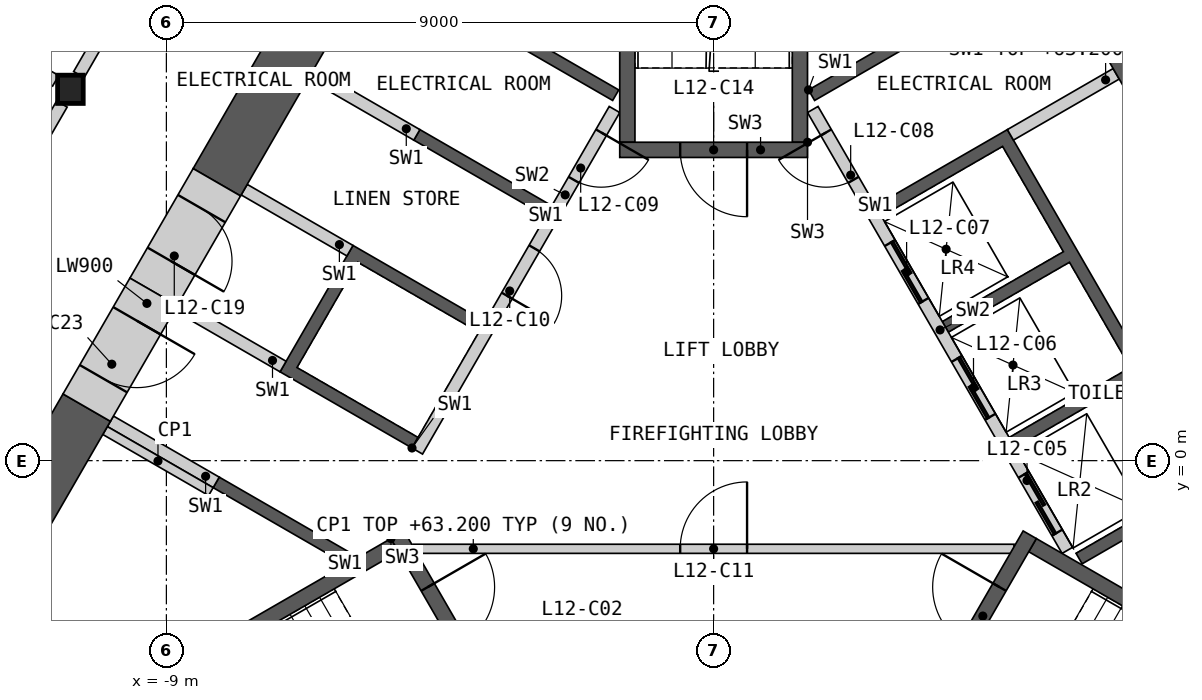
"""IFC4 building model, lengths in metres.
Left out: names, types, materials, properties, quantities, classifications, styles, units other than length and angle.
Written with IfcOpenShell. Run it as: python <this file> out.ifc"""

import sys

from ifc_helpers import new_model, si_unit, direction, frame, frame_2d, origin, origin_2d, place, context, subcontext, project, spatial, polyline, rectangle, i_section, outline, extrude, element, fill, save


model = new_model("IFC4")
c1 = context("Model", 3, precision=1e-05, world=origin(), true_north=direction((0.0, 1.0)))
c2 = subcontext(c1, "Body", "Model", "MODEL_VIEW")
j1 = project(units=[si_unit("LENGTHUNIT", "METRE"), si_unit("PLANEANGLEUNIT", "RADIAN")], contexts=[c1])
p1 = place(None, origin())
s1 = spatial("IfcSite", under=j1, at=p1, CompositionType="ELEMENT")
p2 = place(p1, origin())
s2 = spatial("IfcBuilding", under=s1, at=p2, CompositionType="ELEMENT")
p3 = place(p2, frame((0.0, 0.0, 59.4)))
s3 = spatial("IfcBuildingStorey", under=s2, at=p3, CompositionType="ELEMENT", Elevation=59.4)
p4 = place(p3, frame((-10.578, 6.107, 0.0), z_axis=(0.0, 0.0, 1.0), x_axis=(1.0, 0.0, 0.0)))
e1 = element("IfcColumn", 1, at=p4, inside=s3, PredefinedType="COLUMN", context=c2, shape_type="SweptSolid", body=[
    extrude(i_section(OverallWidth=0.421, OverallDepth=0.465, WebThickness=0.045, FlangeThickness=0.072, at=origin_2d()), origin(), (0.0, 0.0, 1.0), 4.2),
])
p5 = place(p3, origin())
e2 = element("IfcWall", 2, at=p5, inside=s3, PredefinedType="SHEAR", context=c2, shape_type="SweptSolid", body=[
    extrude(outline(polyline([(1.561, 6.097), (3.731, 7.35), (3.831, 7.177), (1.66, 5.924), (1.561, 6.097)])), origin(), (0.0, 0.0, 1.0), 3.8),
])
p6 = place(p3, origin())
e3 = element("IfcWall", 3, at=p6, inside=s3, PredefinedType="SHEAR", context=c2, shape_type="SweptSolid", body=[
    extrude(outline(polyline([(2.66, 4.192), (4.831, 5.445), (8.231, -0.444), (6.061, -1.697), (5.96, -1.524), (7.952, -0.374), (6.952, 1.358), (4.96, 0.208), (4.861, 0.381), (6.852, 1.531), (5.852, 3.263), (3.861, 2.113), (3.76, 2.287), (5.752, 3.437), (4.752, 5.169), (2.76, 4.019), (2.66, 4.192)])), origin(), (0.0, 0.0, 1.0), 3.8),
])
p7 = place(p3, frame((5.817, -1.476, 0.0), z_axis=(0.0, 0.0, 1.0), x_axis=(-0.500002616675, 0.866023893041, 0.0)))
e4 = element("IfcWall", 4, at=p7, inside=s3, PredefinedType="SOLIDWALL", context=c2, shape_type="SweptSolid", body=[
    extrude(rectangle(XDim=8.373, YDim=0.2, at=frame_2d((4.187, 0.0))), origin(), (0.0, 0.0, 1.0), 3.8),
])
p8 = place(p7, frame((0.337, 0.0, 0.0)))
e5 = element("IfcOpeningElement", 5, at=p8, cuts=e4, PredefinedType="OPENING", context=c2, shape_type="SweptSolid", body=[
    extrude(rectangle(XDim=1.1, YDim=2.1, at=frame_2d((0.55, 1.05))), frame((0.0, 0.11, 0.0), z_axis=(0.0, -1.0, 0.0), x_axis=(1.0, 0.0, 0.0)), (0.0, 0.0, 1.0), 0.22),
])
p9 = place(p7, frame((2.537, 0.0, 0.0)))
e6 = element("IfcOpeningElement", 6, at=p9, cuts=e4, PredefinedType="OPENING", context=c2, shape_type="SweptSolid", body=[
    extrude(rectangle(XDim=1.1, YDim=2.1, at=frame_2d((0.55, 1.05))), frame((0.0, 0.11, 0.0), z_axis=(0.0, -1.0, 0.0), x_axis=(1.0, 0.0, 0.0)), (0.0, 0.0, 1.0), 0.22),
])
p10 = place(p7, frame((4.737, 0.0, 0.0)))
e7 = element("IfcOpeningElement", 7, at=p10, cuts=e4, PredefinedType="OPENING", context=c2, shape_type="SweptSolid", body=[
    extrude(rectangle(XDim=1.1, YDim=2.1, at=frame_2d((0.55, 1.05))), frame((0.0, 0.11, 0.0), z_axis=(0.0, -1.0, 0.0), x_axis=(1.0, 0.0, 0.0)), (0.0, 0.0, 1.0), 0.22),
])
p11 = place(p7, frame((7.037, 0.0, 0.0)))
e8 = element("IfcOpeningElement", 8, at=p11, cuts=e4, PredefinedType="OPENING", context=c2, shape_type="SweptSolid", body=[
    extrude(rectangle(XDim=0.9, YDim=2.1, at=frame_2d((0.45, 1.05))), frame((0.0, 0.11, 0.0), z_axis=(0.0, -1.0, 0.0), x_axis=(1.0, 0.0, 0.0)), (0.0, 0.0, 1.0), 0.22),
])
p12 = place(p3, frame((4.881, 5.358, 0.0), z_axis=(0.0, 0.0, 1.0), x_axis=(0.866035824272, 0.499981950752, 0.0)))
e9 = element("IfcWall", 9, at=p12, inside=s3, PredefinedType="SHEAR", context=c2, shape_type="SweptSolid", body=[
    extrude(rectangle(XDim=2.009, YDim=0.2, at=frame_2d((1.004, 0.0))), origin(), (0.0, 0.0, 1.0), 3.8),
])
p13 = place(p3, origin())
e10 = element("IfcWall", 10, at=p13, inside=s3, PredefinedType="SHEAR", context=c2, shape_type="SweptSolid", body=[
    extrude(outline(polyline([(-6.061, -1.697), (-8.231, -0.444), (-8.131, -0.271), (-5.96, -1.524), (-6.061, -1.697)])), origin(), (0.0, 0.0, 1.0), 3.8),
])
p14 = place(p3, origin())
e11 = element("IfcWall", 11, at=p14, inside=s3, PredefinedType="SHEAR", context=c2, shape_type="SweptSolid", body=[
    extrude(outline(polyline([(-4.96, 0.208), (-7.131, 1.461), (-5.931, 3.54), (-3.76, 2.287), (-3.861, 2.113), (-5.852, 3.263), (-6.852, 1.531), (-4.861, 0.381), (-4.96, 0.208)])), origin(), (0.0, 0.0, 1.0), 3.8),
])
p15 = place(p3, origin())
e12 = element("IfcWall", 12, at=p15, inside=s3, PredefinedType="SHEAR", context=c2, shape_type="SweptSolid", body=[
    extrude(outline(polyline([(-2.76, 4.019), (-4.931, 5.272), (-4.831, 5.445), (-2.66, 4.192), (-2.76, 4.019)])), origin(), (0.0, 0.0, 1.0), 3.8),
])
p16 = place(p3, origin())
e13 = element("IfcWall", 13, at=p16, inside=s3, PredefinedType="SHEAR", context=c2, shape_type="SweptSolid", body=[
    extrude(outline(polyline([(-3.731, 7.35), (-1.561, 6.097), (-1.66, 5.924), (-3.831, 7.177), (-3.731, 7.35)])), origin(), (0.0, 0.0, 1.0), 3.8),
])
p17 = place(p3, frame((-1.631, 5.776, 0.0), z_axis=(0.0, 0.0, 1.0), x_axis=(-0.499992876559, -0.866029516466, 0.0)))
e14 = element("IfcWall", 14, at=p17, inside=s3, PredefinedType="SOLIDWALL", context=c2, shape_type="SweptSolid", body=[
    extrude(rectangle(XDim=6.486, YDim=0.2, at=frame_2d((3.243, 0.0))), origin(), (0.0, 0.0, 1.0), 3.8),
])
p18 = place(p17, frame((0.437, 0.0, 0.0)))
e15 = element("IfcOpeningElement", 15, at=p18, cuts=e14, PredefinedType="OPENING", context=c2, shape_type="SweptSolid", body=[
    extrude(rectangle(XDim=0.9, YDim=2.1, at=frame_2d((0.45, 1.05))), frame((0.0, 0.11, 0.0), z_axis=(0.0, -1.0, 0.0), x_axis=(1.0, 0.0, 0.0)), (0.0, 0.0, 1.0), 0.22),
])
p19 = place(p17, frame((2.637, 0.0, 0.0)))
e16 = element("IfcOpeningElement", 16, at=p19, cuts=e14, PredefinedType="OPENING", context=c2, shape_type="SweptSolid", body=[
    extrude(rectangle(XDim=0.9, YDim=2.1, at=frame_2d((0.45, 1.05))), frame((0.0, 0.11, 0.0), z_axis=(0.0, -1.0, 0.0), x_axis=(1.0, 0.0, 0.0)), (0.0, 0.0, 1.0), 0.22),
])
p20 = place(p3, frame((-4.881, 5.358, 0.0), z_axis=(0.0, 0.0, 1.0), x_axis=(-0.866035824272, 0.499981950752, 0.0)))
e17 = element("IfcWall", 17, at=p20, inside=s3, PredefinedType="SHEAR", context=c2, shape_type="SweptSolid", body=[
    extrude(rectangle(XDim=2.009, YDim=0.2, at=frame_2d((1.004, 0.0))), origin(), (0.0, 0.0, 1.0), 3.8),
])
p21 = place(p3, frame((-5.981, 3.453, 0.0), z_axis=(0.0, 0.0, 1.0), x_axis=(-0.866013584312, 0.500020471368, 0.0)))
e18 = element("IfcWall", 18, at=p21, inside=s3, PredefinedType="SHEAR", context=c2, shape_type="SweptSolid", body=[
    extrude(rectangle(XDim=2.009, YDim=0.2, at=frame_2d((1.005, 0.0))), origin(), (0.0, 0.0, 1.0), 3.8),
])
p22 = place(p3, frame((-7.081, 1.548, 0.0), z_axis=(0.0, 0.0, 1.0), x_axis=(-0.865983199114, 0.50007309351, 0.0)))
e19 = element("IfcWall", 19, at=p22, inside=s3, PredefinedType="SHEAR", context=c2, shape_type="SweptSolid", body=[
    extrude(rectangle(XDim=2.009, YDim=0.2, at=frame_2d((1.004, 0.0))), origin(), (0.0, 0.0, 1.0), 3.8),
])
p23 = place(p3, frame((-8.181, -0.357, 0.0), z_axis=(0.0, 0.0, 1.0), x_axis=(-0.866035824272, 0.499981950752, 0.0)))
e20 = element("IfcWall", 20, at=p23, inside=s3, PredefinedType="SHEAR", context=c2, shape_type="SweptSolid", body=[
    extrude(rectangle(XDim=2.009, YDim=0.2, at=frame_2d((1.004, 0.0))), origin(), (0.0, 0.0, 1.0), 3.8),
])
p24 = place(p3, frame((-4.941, -1.45, 0.0), z_axis=(0.0, 0.0, 1.0), x_axis=(1.0, 0.0, 0.0)))
e21 = element("IfcWall", 21, at=p24, inside=s3, PredefinedType="PARTITIONING", context=c2, shape_type="SweptSolid", body=[
    extrude(rectangle(XDim=9.882, YDim=0.15, at=frame_2d((4.941, 0.0))), origin(), (0.0, 0.0, 1.0), 3.8),
])
p25 = place(p24, frame((4.391, 0.0, 0.0)))
e22 = element("IfcOpeningElement", 22, at=p25, cuts=e21, PredefinedType="OPENING", context=c2, shape_type="SweptSolid", body=[
    extrude(rectangle(XDim=1.1, YDim=2.1, at=frame_2d((0.55, 1.05))), frame((0.0, 0.085, 0.0), z_axis=(0.0, -1.0, 0.0), x_axis=(1.0, 0.0, 0.0)), (0.0, 0.0, 1.0), 0.17),
])
p26 = place(p3, origin())
e23 = element("IfcWall", 23, at=p26, inside=s3, PredefinedType="SHEAR", context=c2, shape_type="SweptSolid", body=[
    extrude(outline(polyline([(-5.307, -1.281), (-10.374, -4.206), (-10.032, -4.298), (-5.182, -1.498), (-5.307, -1.281)])), origin(), (0.0, 0.0, 1.0), 3.8),
])
p27 = place(p3, frame((-5.199, -1.219, 0.0), z_axis=(0.0, 0.0, 1.0), x_axis=(0.499982516597, -0.866035497597, 0.0)))
e24 = element("IfcWall", 24, at=p27, inside=s3, PredefinedType="SHEAR", context=c2, shape_type="SweptSolid", body=[
    extrude(rectangle(XDim=3.088, YDim=0.25, at=frame_2d((1.544, 0.0))), origin(), (0.0, 0.0, 1.0), 3.8),
])
p28 = place(p27, frame((0.994, 0.0, 0.0)))
e25 = element("IfcOpeningElement", 25, at=p28, cuts=e24, PredefinedType="OPENING", context=c2, shape_type="SweptSolid", body=[
    extrude(rectangle(XDim=1.1, YDim=2.1, at=frame_2d((0.55, 1.05))), frame((0.0, 0.135, 0.0), z_axis=(0.0, -1.0, 0.0), x_axis=(1.0, 0.0, 0.0)), (0.0, 0.0, 1.0), 0.27),
])
p29 = place(p3, origin())
e26 = element("IfcWall", 26, at=p29, inside=s3, PredefinedType="SHEAR", context=c2, shape_type="SweptSolid", body=[
    extrude(outline(polyline([(10.032, -4.298), (10.374, -4.206), (5.307, -1.281), (5.182, -1.498), (10.032, -4.298)])), origin(), (0.0, 0.0, 1.0), 3.8),
])
p30 = place(p3, frame((3.655, -3.893, 0.0), z_axis=(0.0, 0.0, 1.0), x_axis=(0.499982516597, 0.866035497597, 0.0)))
e27 = element("IfcWall", 27, at=p30, inside=s3, PredefinedType="SHEAR", context=c2, shape_type="SweptSolid", body=[
    extrude(rectangle(XDim=3.088, YDim=0.25, at=frame_2d((1.544, 0.0))), origin(), (0.0, 0.0, 1.0), 3.8),
])
p31 = place(p30, frame((0.994, 0.0, 0.0)))
e28 = element("IfcOpeningElement", 28, at=p31, cuts=e27, PredefinedType="OPENING", context=c2, shape_type="SweptSolid", body=[
    extrude(rectangle(XDim=1.1, YDim=2.1, at=frame_2d((0.55, 1.05))), frame((0.0, 0.135, 0.0), z_axis=(0.0, -1.0, 0.0), x_axis=(1.0, 0.0, 0.0)), (0.0, 0.0, 1.0), 0.27),
])
p32 = place(p3, origin())
e29 = element("IfcWall", 29, at=p32, inside=s3, PredefinedType="SHEAR", context=c2, shape_type="SweptSolid", body=[
    extrude(outline(polyline([(1.544, 5.237), (1.544, 11.087), (1.294, 10.837), (1.294, 5.237), (1.544, 5.237)])), origin(), (0.0, 0.0, 1.0), 3.8),
])
p33 = place(p3, origin())
e30 = element("IfcWall", 30, at=p33, inside=s3, PredefinedType="SHEAR", context=c2, shape_type="SweptSolid", body=[
    extrude(outline(polyline([(-1.294, 10.837), (-1.544, 11.087), (-1.544, 5.237), (-1.294, 5.237), (-1.294, 10.837)])), origin(), (0.0, 0.0, 1.0), 3.8),
])
p34 = place(p3, frame((1.544, 5.112, 0.0), z_axis=(0.0, 0.0, 1.0), x_axis=(-1.0, 0.0, 0.0)))
e31 = element("IfcWall", 31, at=p34, inside=s3, PredefinedType="SHEAR", context=c2, shape_type="SweptSolid", body=[
    extrude(rectangle(XDim=3.088, YDim=0.25, at=frame_2d((1.544, 0.0))), origin(), (0.0, 0.0, 1.0), 3.8),
])
p35 = place(p34, frame((0.994, 0.0, 0.0)))
e32 = element("IfcOpeningElement", 32, at=p35, cuts=e31, PredefinedType="OPENING", context=c2, shape_type="SweptSolid", body=[
    extrude(rectangle(XDim=1.1, YDim=2.1, at=frame_2d((0.55, 1.05))), frame((0.0, 0.135, 0.0), z_axis=(0.0, -1.0, 0.0), x_axis=(1.0, 0.0, 0.0)), (0.0, 0.0, 1.0), 0.27),
])
p36 = place(p3, frame((-8.268, -0.509, 0.0), z_axis=(0.0, 0.0, 1.0), x_axis=(-0.866035824272, 0.499981950752, 0.0)))
e33 = element("IfcWall", 33, at=p36, inside=s3, PredefinedType="PARTITIONING", context=c2, shape_type="SweptSolid", body=[
    extrude(rectangle(XDim=2.009, YDim=0.15, at=frame_2d((1.004, 0.0))), origin(), (0.0, 0.0, 1.0), 3.8),
])
p37 = place(p3, frame((8.16, 4.596, 0.0), z_axis=(0.0, 0.0, 1.0), x_axis=(-0.500009830349, 0.866019728156, 0.0)))
e34 = element("IfcWall", 34, at=p37, inside=s3, PredefinedType="SHEAR", context=c2, shape_type="SweptSolid", body=[
    extrude(rectangle(XDim=15.541, YDim=0.9, at=frame_2d((7.771, 0.0))), origin(), (0.0, 0.0, 1.0), 3.8),
])
p38 = place(p3, frame((-3.637, 12.43, 0.0), z_axis=(0.0, 0.0, 1.0), x_axis=(-0.500011513458, -0.866018756384, 0.0)))
e35 = element("IfcWall", 35, at=p38, inside=s3, PredefinedType="SHEAR", context=c2, shape_type="SweptSolid", body=[
    extrude(rectangle(XDim=9.066, YDim=0.9, at=frame_2d((4.533, 0.0))), origin(), (0.0, 0.0, 1.0), 3.8),
])
p39 = place(p3, frame((-10.31, 0.872, 0.0), z_axis=(0.0, 0.0, 1.0), x_axis=(-0.499968858743, -0.866043382451, 0.0)))
e36 = element("IfcWall", 36, at=p39, inside=s3, PredefinedType="SHEAR", context=c2, shape_type="SweptSolid", body=[
    extrude(rectangle(XDim=4.546, YDim=0.9, at=frame_2d((2.273, 0.0))), origin(), (0.0, 0.0, 1.0), 3.8),
])
p40 = place(p3, frame((-8.17, 4.579, 0.0), z_axis=(0.0, 0.0, 1.0), x_axis=(-0.499888406853, -0.866089822532, 0.0)))
e37 = element("IfcWall", 37, at=p40, inside=s3, PredefinedType="SHEAR", context=c2, shape_type="SweptSolid", body=[
    extrude(rectangle(XDim=2.08, YDim=0.9, at=frame_2d((1.04, 0.0))), origin(), (0.0, 0.0, 1.0), 3.8),
])
p41 = place(p40, frame((0.5, 0.0, 0.0)))
e38 = element("IfcOpeningElement", 38, at=p41, cuts=e37, PredefinedType="OPENING", context=c2, shape_type="SweptSolid", body=[
    extrude(rectangle(XDim=1.0, YDim=2.1, at=frame_2d((0.5, 1.05))), frame((0.0, 0.46, 0.0), z_axis=(0.0, -1.0, 0.0), x_axis=(1.0, 0.0, 0.0)), (0.0, 0.0, 1.0), 0.92),
])
p42 = place(p3, frame((-9.21, 2.777, 0.0), z_axis=(0.0, 0.0, 1.0), x_axis=(-0.500077893725, -0.86598042715, 0.0)))
e39 = element("IfcWall", 39, at=p42, inside=s3, PredefinedType="SHEAR", context=c2, shape_type="SweptSolid", body=[
    extrude(rectangle(XDim=2.2, YDim=0.9, at=frame_2d((1.1, 0.0))), origin(), (0.0, 0.0, 1.0), 3.8),
])
p43 = place(p42, frame((0.55, 0.0, 0.0)))
e40 = element("IfcOpeningElement", 40, at=p43, cuts=e39, PredefinedType="OPENING", context=c2, shape_type="SweptSolid", body=[
    extrude(rectangle(XDim=1.1, YDim=2.1, at=frame_2d((0.55, 1.05))), frame((0.0, 0.46, 0.0), z_axis=(0.0, -1.0, 0.0), x_axis=(1.0, 0.0, 0.0)), (0.0, 0.0, 1.0), 0.92),
])
p44 = place(p3, frame((5.429, 15.026, 0.0), z_axis=(0.0, 0.0, 1.0), x_axis=(0.50001002959, -0.86601961312, 0.0)))
e41 = element("IfcWall", 41, at=p44, inside=s3, PredefinedType="PARTITIONING", context=c2, shape_type="SweptSolid", body=[
    extrude(rectangle(XDim=10.019, YDim=0.2, at=frame_2d((5.009, 0.0))), origin(), (0.0, 0.0, 1.0), 3.8),
])
p45 = place(p44, frame((4.059, 0.0, 0.0)))
e42 = element("IfcOpeningElement", 42, at=p45, cuts=e41, PredefinedType="OPENING", context=c2, shape_type="SweptSolid", body=[
    extrude(rectangle(XDim=1.8, YDim=2.1, at=frame_2d((0.9, 1.05))), frame((0.0, 0.11, 0.0), z_axis=(0.0, -1.0, 0.0), x_axis=(1.0, 0.0, 0.0)), (0.0, 0.0, 1.0), 0.22),
])
p46 = place(p3, frame((-10.439, 6.35, 0.0), z_axis=(0.0, 0.0, 1.0), x_axis=(0.50001002959, 0.86601961312, 0.0)))
e43 = element("IfcWall", 43, at=p46, inside=s3, PredefinedType="PARTITIONING", context=c2, shape_type="SweptSolid", body=[
    extrude(rectangle(XDim=10.019, YDim=0.2, at=frame_2d((5.009, 0.0))), origin(), (0.0, 0.0, 1.0), 3.8),
])
p47 = place(p46, frame((4.259, 0.0, 0.0)))
e44 = element("IfcOpeningElement", 44, at=p47, cuts=e43, PredefinedType="OPENING", context=c2, shape_type="SweptSolid", body=[
    extrude(rectangle(XDim=1.0, YDim=2.1, at=frame_2d((0.5, 1.05))), frame((0.0, 0.11, 0.0), z_axis=(0.0, -1.0, 0.0), x_axis=(1.0, 0.0, 0.0)), (0.0, 0.0, 1.0), 0.22),
])
p48 = place(p3, frame((-15.728, -2.811, 0.0), z_axis=(0.0, 0.0, 1.0), x_axis=(0.49999175339, 0.866030164915, 0.0)))
e45 = element("IfcWall", 45, at=p48, inside=s3, PredefinedType="PARTITIONING", context=c2, shape_type="SweptSolid", body=[
    extrude(rectangle(XDim=10.019, YDim=0.2, at=frame_2d((5.009, 0.0))), origin(), (0.0, 0.0, 1.0), 3.8),
])
p49 = place(p48, frame((7.266, 0.0, 0.0)))
e46 = element("IfcOpeningElement", 46, at=p49, cuts=e45, PredefinedType="OPENING", context=c2, shape_type="SweptSolid", body=[
    extrude(rectangle(XDim=1.0, YDim=2.1, at=frame_2d((0.5, 1.05))), frame((0.0, 0.11, 0.0), z_axis=(0.0, -1.0, 0.0), x_axis=(1.0, 0.0, 0.0)), (0.0, 0.0, 1.0), 0.22),
])
p50 = place(p3, frame((-21.947, 12.671, 0.0), z_axis=(0.0, 0.0, 1.0), x_axis=(0.866026729935, -0.499997703033, 0.0)))
e47 = element("IfcWall", 47, at=p50, inside=s3, PredefinedType="PARTITIONING", context=c2, shape_type="SweptSolid", body=[
    extrude(rectangle(XDim=12.848, YDim=0.2, at=frame_2d((6.424, 0.0))), origin(), (0.0, 0.0, 1.0), 2.885),
])
p51 = place(p8, origin())
e48 = element("IfcDoor", 48, at=p51, inside=s3, OperationType="SLIDING_TO_LEFT", PredefinedType="DOOR", context=c2, shape_type="SweptSolid", body=[
    extrude(rectangle(XDim=1.1, YDim=2.1, at=frame_2d((0.55, 1.05))), frame((0.0, 0.025, 0.0), z_axis=(0.0, -1.0, 0.0), x_axis=(1.0, 0.0, 0.0)), (0.0, 0.0, 1.0), 0.05),
])
fill(e5, e48)
p52 = place(p9, origin())
e49 = element("IfcDoor", 49, at=p52, inside=s3, OperationType="SLIDING_TO_LEFT", PredefinedType="DOOR", context=c2, shape_type="SweptSolid", body=[
    extrude(rectangle(XDim=1.1, YDim=2.1, at=frame_2d((0.55, 1.05))), frame((0.0, 0.025, 0.0), z_axis=(0.0, -1.0, 0.0), x_axis=(1.0, 0.0, 0.0)), (0.0, 0.0, 1.0), 0.05),
])
fill(e6, e49)
p53 = place(p10, origin())
e50 = element("IfcDoor", 50, at=p53, inside=s3, OperationType="SLIDING_TO_LEFT", PredefinedType="DOOR", context=c2, shape_type="SweptSolid", body=[
    extrude(rectangle(XDim=1.1, YDim=2.1, at=frame_2d((0.55, 1.05))), frame((0.0, 0.025, 0.0), z_axis=(0.0, -1.0, 0.0), x_axis=(1.0, 0.0, 0.0)), (0.0, 0.0, 1.0), 0.05),
])
fill(e7, e50)
p54 = place(p11, origin())
e51 = element("IfcDoor", 51, at=p54, inside=s3, OperationType="SINGLE_SWING_RIGHT", PredefinedType="DOOR", context=c2, shape_type="SweptSolid", body=[
    extrude(rectangle(XDim=0.9, YDim=2.1, at=frame_2d((0.45, 1.05))), frame((0.0, 0.025, 0.0), z_axis=(0.0, -1.0, 0.0), x_axis=(1.0, 0.0, 0.0)), (0.0, 0.0, 1.0), 0.05),
])
fill(e8, e51)
p55 = place(p18, origin())
e52 = element("IfcDoor", 52, at=p55, inside=s3, OperationType="SINGLE_SWING_LEFT", PredefinedType="DOOR", context=c2, shape_type="SweptSolid", body=[
    extrude(rectangle(XDim=0.9, YDim=2.1, at=frame_2d((0.45, 1.05))), frame((0.0, 0.025, 0.0), z_axis=(0.0, -1.0, 0.0), x_axis=(1.0, 0.0, 0.0)), (0.0, 0.0, 1.0), 0.05),
])
fill(e15, e52)
p56 = place(p19, origin())
e53 = element("IfcDoor", 53, at=p56, inside=s3, OperationType="SINGLE_SWING_RIGHT", PredefinedType="DOOR", context=c2, shape_type="SweptSolid", body=[
    extrude(rectangle(XDim=0.9, YDim=2.1, at=frame_2d((0.45, 1.05))), frame((0.0, 0.025, 0.0), z_axis=(0.0, -1.0, 0.0), x_axis=(1.0, 0.0, 0.0)), (0.0, 0.0, 1.0), 0.05),
])
fill(e16, e53)
p57 = place(p25, origin())
e54 = element("IfcDoor", 54, at=p57, inside=s3, OperationType="SINGLE_SWING_RIGHT", PredefinedType="DOOR", context=c2, shape_type="SweptSolid", body=[
    extrude(rectangle(XDim=1.1, YDim=2.1, at=frame_2d((0.55, 1.05))), frame((0.0, 0.025, 0.0), z_axis=(0.0, -1.0, 0.0), x_axis=(1.0, 0.0, 0.0)), (0.0, 0.0, 1.0), 0.05),
])
fill(e22, e54)
p58 = place(p28, origin())
e55 = element("IfcDoor", 55, at=p58, inside=s3, OperationType="SINGLE_SWING_LEFT", PredefinedType="DOOR", context=c2, shape_type="SweptSolid", body=[
    extrude(rectangle(XDim=1.1, YDim=2.1, at=frame_2d((0.55, 1.05))), frame((0.0, 0.025, 0.0), z_axis=(0.0, -1.0, 0.0), x_axis=(1.0, 0.0, 0.0)), (0.0, 0.0, 1.0), 0.05),
])
fill(e25, e55)
p59 = place(p31, origin())
e56 = element("IfcDoor", 56, at=p59, inside=s3, OperationType="SINGLE_SWING_RIGHT", PredefinedType="DOOR", context=c2, shape_type="SweptSolid", body=[
    extrude(rectangle(XDim=1.1, YDim=2.1, at=frame_2d((0.55, 1.05))), frame((0.0, 0.025, 0.0), z_axis=(0.0, -1.0, 0.0), x_axis=(1.0, 0.0, 0.0)), (0.0, 0.0, 1.0), 0.05),
])
fill(e28, e56)
p60 = place(p35, origin())
e57 = element("IfcDoor", 57, at=p60, inside=s3, OperationType="SINGLE_SWING_LEFT", PredefinedType="DOOR", context=c2, shape_type="SweptSolid", body=[
    extrude(rectangle(XDim=1.1, YDim=2.1, at=frame_2d((0.55, 1.05))), frame((0.0, 0.025, 0.0), z_axis=(0.0, -1.0, 0.0), x_axis=(1.0, 0.0, 0.0)), (0.0, 0.0, 1.0), 0.05),
])
fill(e32, e57)
p61 = place(p41, origin())
e58 = element("IfcDoor", 58, at=p61, inside=s3, OperationType="SINGLE_SWING_RIGHT", PredefinedType="DOOR", context=c2, shape_type="SweptSolid", body=[
    extrude(rectangle(XDim=1.0, YDim=2.1, at=frame_2d((0.5, 1.05))), frame((0.0, 0.205, 0.0), z_axis=(0.0, -1.0, 0.0), x_axis=(1.0, 0.0, 0.0)), (0.0, 0.0, 1.0), 0.05),
])
fill(e38, e58)
p62 = place(p43, origin())
e59 = element("IfcDoor", 59, at=p62, inside=s3, OperationType="SINGLE_SWING_LEFT", PredefinedType="DOOR", context=c2, shape_type="SweptSolid", body=[
    extrude(rectangle(XDim=1.1, YDim=2.1, at=frame_2d((0.55, 1.05))), frame((0.0, 0.205, 0.0), z_axis=(0.0, -1.0, 0.0), x_axis=(1.0, 0.0, 0.0)), (0.0, 0.0, 1.0), 0.05),
])
fill(e40, e59)
save(model, sys.argv[1])
